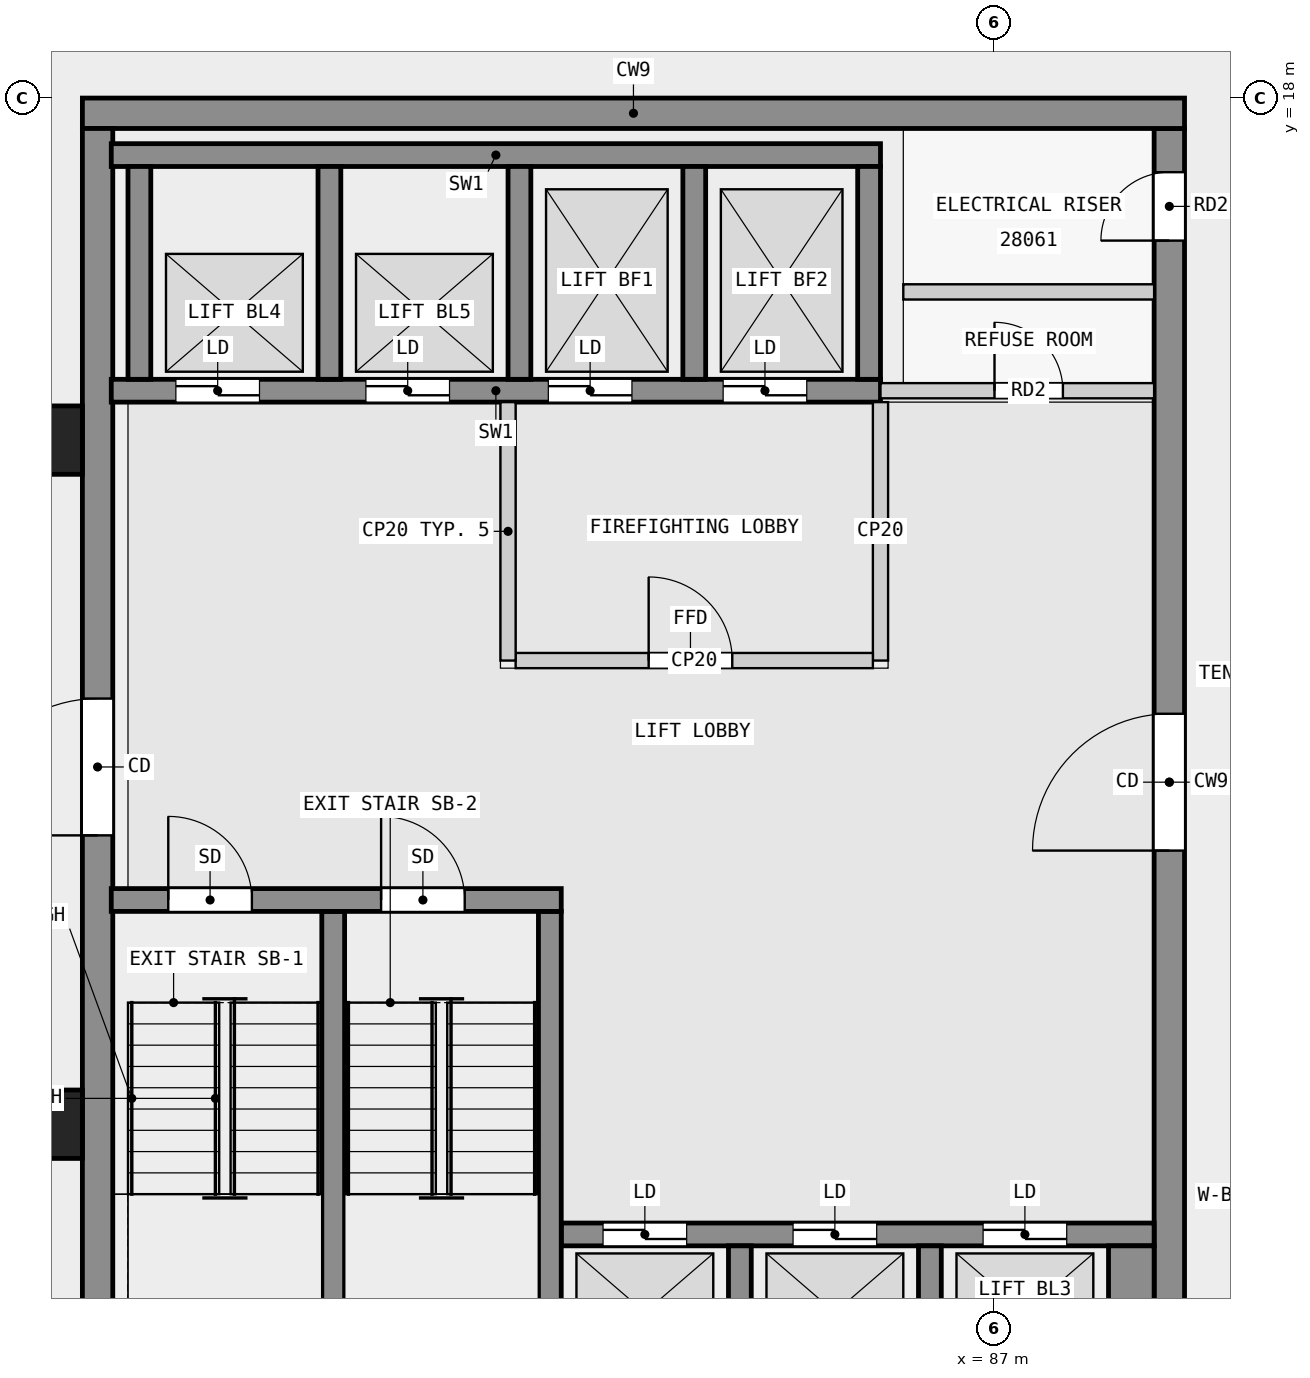
"""IFC4 building model, lengths in metres.
Left out: names, types, materials, properties, quantities, classifications, styles, units other than length and angle.
Written with IfcOpenShell. Run it as: python <this file> out.ifc"""

import sys

from ifc_helpers import new_model, si_unit, direction, frame, frame_2d, origin, origin_2d, place, context, subcontext, project, spatial, rectangle, extrude, element, fill, save


model = new_model("IFC4")
c1 = context("Model", 3, precision=1e-05, world=origin(), true_north=direction((0.0, 1.0)))
c2 = subcontext(c1, "Body", "Model", "MODEL_VIEW")
j1 = project(units=[si_unit("LENGTHUNIT", "METRE"), si_unit("PLANEANGLEUNIT", "RADIAN")], contexts=[c1])
p1 = place(None, origin())
s1 = spatial("IfcSite", under=j1, at=p1, CompositionType="ELEMENT")
p2 = place(p1, origin())
s2 = spatial("IfcBuilding", under=s1, at=p2, CompositionType="ELEMENT")
p3 = place(p2, frame((0.0, 0.0, 109.8)))
s3 = spatial("IfcBuildingStorey", under=s2, at=p3, CompositionType="ELEMENT", Elevation=109.8)
for number, where, z_axis, x_axis in (
    (1, (74.55, 13.5, 0.0), (0.0, 0.0, 1.0), (1.0, 0.0, 0.0)),
    (2, (74.55, 4.5, 0.0), (0.0, 0.0, 1.0), (1.0, 0.0, 0.0)),
):
    element("IfcColumn", number, at=place(p3, frame(where, z_axis=z_axis, x_axis=x_axis)), inside=s3, PredefinedType="COLUMN", context=c2, shape_type="SweptSolid", body=[
        extrude(rectangle(XDim=0.9, YDim=0.9, at=origin_2d()), origin(), (0.0, 0.0, 1.0), 3.5),
    ])
p4 = place(p3, frame((75.0, 17.8, 0.0), z_axis=(0.0, 0.0, 1.0), x_axis=(1.0, 0.0, 0.0)))
e3 = element("IfcWall", 3, at=p4, inside=s3, PredefinedType="SHEAR", context=c2, shape_type="SweptSolid", body=[
    extrude(rectangle(XDim=14.5, YDim=0.4, at=frame_2d((7.25, 0.0))), origin(), (0.0, 0.0, 1.0), 3.25),
])
p5 = place(p3, frame((75.2, 0.4, 0.0), z_axis=(0.0, 0.0, 1.0), x_axis=(0.0, 1.0, 0.0)))
e4 = element("IfcWall", 4, at=p5, inside=s3, PredefinedType="SHEAR", context=c2, shape_type="SweptSolid", body=[
    extrude(rectangle(XDim=17.2, YDim=0.4, at=frame_2d((8.6, 0.0))), origin(), (0.0, 0.0, 1.0), 3.25),
])
p6 = place(p5, frame((7.9, 0.0, 0.0)))
e5 = element("IfcOpeningElement", 5, at=p6, cuts=e4, PredefinedType="OPENING", context=c2, shape_type="SweptSolid", body=[
    extrude(rectangle(XDim=1.8, YDim=2.1, at=frame_2d((0.9, 1.05))), frame((0.0, 0.21, 0.0), z_axis=(0.0, -1.0, 0.0), x_axis=(1.0, 0.0, 0.0)), (0.0, 0.0, 1.0), 0.42),
])
p7 = place(p3, frame((89.3, 0.4, 0.0), z_axis=(0.0, 0.0, 1.0), x_axis=(0.0, 1.0, 0.0)))
e6 = element("IfcWall", 6, at=p7, inside=s3, PredefinedType="SHEAR", context=c2, shape_type="SweptSolid", body=[
    extrude(rectangle(XDim=17.2, YDim=0.4, at=frame_2d((8.6, 0.0))), origin(), (0.0, 0.0, 1.0), 3.25),
])
p8 = place(p7, frame((7.7, 0.0, 0.0)))
e7 = element("IfcOpeningElement", 7, at=p8, cuts=e6, PredefinedType="OPENING", context=c2, shape_type="SweptSolid", body=[
    extrude(rectangle(XDim=1.8, YDim=2.1, at=frame_2d((0.9, 1.05))), frame((0.0, 0.21, 0.0), z_axis=(0.0, -1.0, 0.0), x_axis=(1.0, 0.0, 0.0)), (0.0, 0.0, 1.0), 0.42),
])
p9 = place(p7, frame((15.725, 0.0, 0.0)))
e8 = element("IfcOpeningElement", 8, at=p9, cuts=e6, PredefinedType="OPENING", context=c2, shape_type="SweptSolid", body=[
    extrude(rectangle(XDim=0.9, YDim=2.1, at=frame_2d((0.45, 1.05))), frame((0.0, 0.21, 0.0), z_axis=(0.0, -1.0, 0.0), x_axis=(1.0, 0.0, 0.0)), (0.0, 0.0, 1.0), 0.42),
])
p10 = place(p3, frame((75.38, 7.45, 0.0), z_axis=(0.0, 0.0, 1.0), x_axis=(1.0, 0.0, 0.0)))
e9 = element("IfcWall", 9, at=p10, inside=s3, PredefinedType="SHEAR", context=c2, shape_type="SweptSolid", body=[
    extrude(rectangle(XDim=5.92, YDim=0.3, at=frame_2d((2.96, 0.0))), origin(), (0.0, 0.0, 1.0), 3.25),
])
p11 = place(p10, frame((0.75, 0.0, 0.0)))
e10 = element("IfcOpeningElement", 10, at=p11, cuts=e9, PredefinedType="OPENING", context=c2, shape_type="SweptSolid", body=[
    extrude(rectangle(XDim=1.1, YDim=2.1, at=frame_2d((0.55, 1.05))), frame((0.0, 0.16, 0.0), z_axis=(0.0, -1.0, 0.0), x_axis=(1.0, 0.0, 0.0)), (0.0, 0.0, 1.0), 0.32),
])
p12 = place(p10, frame((3.55, 0.0, 0.0)))
e11 = element("IfcOpeningElement", 11, at=p12, cuts=e9, PredefinedType="OPENING", context=c2, shape_type="SweptSolid", body=[
    extrude(rectangle(XDim=1.1, YDim=2.1, at=frame_2d((0.55, 1.05))), frame((0.0, 0.16, 0.0), z_axis=(0.0, -1.0, 0.0), x_axis=(1.0, 0.0, 0.0)), (0.0, 0.0, 1.0), 0.32),
])
for number, where, z_axis, x_axis in (
    (12, (78.3, 0.9, 0.0), (0.0, 0.0, 1.0), (0.0, 1.0, 0.0)),
    (13, (81.15, 0.9, 0.0), (0.0, 0.0, 1.0), (0.0, 1.0, 0.0)),
):
    element("IfcWall", number, at=place(p3, frame(where, z_axis=z_axis, x_axis=x_axis)), inside=s3, PredefinedType="SHEAR", context=c2, shape_type="SweptSolid", body=[
        extrude(rectangle(XDim=6.4, YDim=0.3, at=frame_2d((3.2, 0.0))), origin(), (0.0, 0.0, 1.0), 3.25),
    ])
for number, where, z_axis, x_axis in (
    (14, (83.65, 0.9, 0.0), (0.0, 0.0, 1.0), (0.0, 1.0, 0.0)),
    (15, (86.15, 0.9, 0.0), (0.0, 0.0, 1.0), (0.0, 1.0, 0.0)),
):
    element("IfcWall", number, at=place(p3, frame(where, z_axis=z_axis, x_axis=x_axis)), inside=s3, PredefinedType="SHEAR", context=c2, shape_type="SweptSolid", body=[
        extrude(rectangle(XDim=2.0, YDim=0.3, at=frame_2d((1.0, 0.0))), origin(), (0.0, 0.0, 1.0), 3.25),
    ])
p13 = place(p3, frame((88.8, 0.9, 0.0), z_axis=(0.0, 0.0, 1.0), x_axis=(0.0, 1.0, 0.0)))
e16 = element("IfcWall", 16, at=p13, inside=s3, PredefinedType="SHEAR", context=c2, shape_type="SweptSolid", body=[
    extrude(rectangle(XDim=2.0, YDim=0.6, at=frame_2d((1.0, 0.0))), origin(), (0.0, 0.0, 1.0), 3.25),
])
p14 = place(p3, frame((81.3, 3.05, 0.0), z_axis=(0.0, 0.0, 1.0), x_axis=(1.0, 0.0, 0.0)))
e17 = element("IfcWall", 17, at=p14, inside=s3, PredefinedType="SHEAR", context=c2, shape_type="SweptSolid", body=[
    extrude(rectangle(XDim=7.8, YDim=0.3, at=frame_2d((3.9, 0.0))), origin(), (0.0, 0.0, 1.0), 3.25),
])
p15 = place(p14, frame((0.55, 0.0, 0.0)))
e18 = element("IfcOpeningElement", 18, at=p15, cuts=e17, PredefinedType="OPENING", context=c2, shape_type="SweptSolid", body=[
    extrude(rectangle(XDim=1.1, YDim=2.1, at=frame_2d((0.55, 1.05))), frame((0.0, 0.16, 0.0), z_axis=(0.0, -1.0, 0.0), x_axis=(1.0, 0.0, 0.0)), (0.0, 0.0, 1.0), 0.32),
])
p16 = place(p14, frame((3.05, 0.0, 0.0)))
e19 = element("IfcOpeningElement", 19, at=p16, cuts=e17, PredefinedType="OPENING", context=c2, shape_type="SweptSolid", body=[
    extrude(rectangle(XDim=1.1, YDim=2.1, at=frame_2d((0.55, 1.05))), frame((0.0, 0.16, 0.0), z_axis=(0.0, -1.0, 0.0), x_axis=(1.0, 0.0, 0.0)), (0.0, 0.0, 1.0), 0.32),
])
p17 = place(p14, frame((5.55, 0.0, 0.0)))
e20 = element("IfcOpeningElement", 20, at=p17, cuts=e17, PredefinedType="OPENING", context=c2, shape_type="SweptSolid", body=[
    extrude(rectangle(XDim=1.1, YDim=2.1, at=frame_2d((0.55, 1.05))), frame((0.0, 0.16, 0.0), z_axis=(0.0, -1.0, 0.0), x_axis=(1.0, 0.0, 0.0)), (0.0, 0.0, 1.0), 0.32),
])
p18 = place(p3, frame((75.38, 17.25, 0.0), z_axis=(0.0, 0.0, 1.0), x_axis=(1.0, 0.0, 0.0)))
e21 = element("IfcWall", 21, at=p18, inside=s3, PredefinedType="SHEAR", context=c2, shape_type="SweptSolid", body=[
    extrude(rectangle(XDim=10.12, YDim=0.3, at=frame_2d((5.06, 0.0))), origin(), (0.0, 0.0, 1.0), 3.25),
])
p19 = place(p3, frame((75.38, 14.15, 0.0), z_axis=(0.0, 0.0, 1.0), x_axis=(1.0, 0.0, 0.0)))
e22 = element("IfcWall", 22, at=p19, inside=s3, PredefinedType="SHEAR", context=c2, shape_type="SweptSolid", body=[
    extrude(rectangle(XDim=10.12, YDim=0.3, at=frame_2d((5.06, 0.0))), origin(), (0.0, 0.0, 1.0), 3.25),
])
p20 = place(p19, frame((0.85, 0.0, 0.0)))
e23 = element("IfcOpeningElement", 23, at=p20, cuts=e22, PredefinedType="OPENING", context=c2, shape_type="SweptSolid", body=[
    extrude(rectangle(XDim=1.1, YDim=2.1, at=frame_2d((0.55, 1.05))), frame((0.0, 0.16, 0.0), z_axis=(0.0, -1.0, 0.0), x_axis=(1.0, 0.0, 0.0)), (0.0, 0.0, 1.0), 0.32),
])
p21 = place(p19, frame((3.35, 0.0, 0.0)))
e24 = element("IfcOpeningElement", 24, at=p21, cuts=e22, PredefinedType="OPENING", context=c2, shape_type="SweptSolid", body=[
    extrude(rectangle(XDim=1.1, YDim=2.1, at=frame_2d((0.55, 1.05))), frame((0.0, 0.16, 0.0), z_axis=(0.0, -1.0, 0.0), x_axis=(1.0, 0.0, 0.0)), (0.0, 0.0, 1.0), 0.32),
])
p22 = place(p19, frame((5.75, 0.0, 0.0)))
e25 = element("IfcOpeningElement", 25, at=p22, cuts=e22, PredefinedType="OPENING", context=c2, shape_type="SweptSolid", body=[
    extrude(rectangle(XDim=1.1, YDim=2.1, at=frame_2d((0.55, 1.05))), frame((0.0, 0.16, 0.0), z_axis=(0.0, -1.0, 0.0), x_axis=(1.0, 0.0, 0.0)), (0.0, 0.0, 1.0), 0.32),
])
p23 = place(p19, frame((8.05, 0.0, 0.0)))
e26 = element("IfcOpeningElement", 26, at=p23, cuts=e22, PredefinedType="OPENING", context=c2, shape_type="SweptSolid", body=[
    extrude(rectangle(XDim=1.1, YDim=2.1, at=frame_2d((0.55, 1.05))), frame((0.0, 0.16, 0.0), z_axis=(0.0, -1.0, 0.0), x_axis=(1.0, 0.0, 0.0)), (0.0, 0.0, 1.0), 0.32),
])
for number, where, z_axis, x_axis in (
    (27, (75.75, 14.3, 0.0), (0.0, 0.0, 1.0), (0.0, 1.0, 0.0)),
    (28, (78.25, 14.3, 0.0), (0.0, 0.0, 1.0), (0.0, 1.0, 0.0)),
    (29, (80.75, 14.3, 0.0), (0.0, 0.0, 1.0), (0.0, 1.0, 0.0)),
    (30, (83.05, 14.3, 0.0), (0.0, 0.0, 1.0), (0.0, 1.0, 0.0)),
    (31, (85.35, 14.3, 0.0), (0.0, 0.0, 1.0), (0.0, 1.0, 0.0)),
):
    element("IfcWall", number, at=place(p3, frame(where, z_axis=z_axis, x_axis=x_axis)), inside=s3, PredefinedType="SHEAR", context=c2, shape_type="SweptSolid", body=[
        extrude(rectangle(XDim=2.8, YDim=0.3, at=frame_2d((1.4, 0.0))), origin(), (0.0, 0.0, 1.0), 3.25),
    ])
p24 = place(p3, frame((80.6, 10.6, 0.0), z_axis=(0.0, 0.0, 1.0), x_axis=(0.0, 1.0, 0.0)))
e32 = element("IfcWall", 32, at=p24, inside=s3, PredefinedType="PARTITIONING", context=c2, shape_type="SweptSolid", body=[
    extrude(rectangle(XDim=3.4, YDim=0.2, at=frame_2d((1.7, 0.0))), origin(), (0.0, 0.0, 1.0), 3.25),
])
p25 = place(p3, frame((80.7, 10.6, 0.0), z_axis=(0.0, 0.0, 1.0), x_axis=(1.0, 0.0, 0.0)))
e33 = element("IfcWall", 33, at=p25, inside=s3, PredefinedType="PARTITIONING", context=c2, shape_type="SweptSolid", body=[
    extrude(rectangle(XDim=4.7, YDim=0.2, at=frame_2d((2.35, 0.0))), origin(), (0.0, 0.0, 1.0), 3.25),
])
p26 = place(p25, frame((1.75, 0.0, 0.0)))
e34 = element("IfcOpeningElement", 34, at=p26, cuts=e33, PredefinedType="OPENING", context=c2, shape_type="SweptSolid", body=[
    extrude(rectangle(XDim=1.1, YDim=2.1, at=frame_2d((0.55, 1.05))), frame((0.0, 0.11, 0.0), z_axis=(0.0, -1.0, 0.0), x_axis=(1.0, 0.0, 0.0)), (0.0, 0.0, 1.0), 0.22),
])
p27 = place(p3, frame((85.5, 10.6, 0.0), z_axis=(0.0, 0.0, 1.0), x_axis=(0.0, 1.0, 0.0)))
e35 = element("IfcWall", 35, at=p27, inside=s3, PredefinedType="PARTITIONING", context=c2, shape_type="SweptSolid", body=[
    extrude(rectangle(XDim=3.4, YDim=0.2, at=frame_2d((1.7, 0.0))), origin(), (0.0, 0.0, 1.0), 3.25),
])
p28 = place(p3, frame((85.5, 14.15, 0.0), z_axis=(0.0, 0.0, 1.0), x_axis=(1.0, 0.0, 0.0)))
e36 = element("IfcWall", 36, at=p28, inside=s3, PredefinedType="PARTITIONING", context=c2, shape_type="SweptSolid", body=[
    extrude(rectangle(XDim=3.6, YDim=0.2, at=frame_2d((1.8, 0.0))), origin(), (0.0, 0.0, 1.0), 3.25),
])
p29 = place(p28, frame((1.5, 0.0, 0.0)))
e37 = element("IfcOpeningElement", 37, at=p29, cuts=e36, PredefinedType="OPENING", context=c2, shape_type="SweptSolid", body=[
    extrude(rectangle(XDim=0.9, YDim=2.1, at=frame_2d((0.45, 1.05))), frame((0.0, 0.11, 0.0), z_axis=(0.0, -1.0, 0.0), x_axis=(1.0, 0.0, 0.0)), (0.0, 0.0, 1.0), 0.22),
])
p30 = place(p3, frame((85.8, 15.45, 0.0), z_axis=(0.0, 0.0, 1.0), x_axis=(1.0, 0.0, 0.0)))
e38 = element("IfcWall", 38, at=p30, inside=s3, PredefinedType="PARTITIONING", context=c2, shape_type="SweptSolid", body=[
    extrude(rectangle(XDim=3.3, YDim=0.2, at=frame_2d((1.65, 0.0))), origin(), (0.0, 0.0, 1.0), 3.25),
])
p31 = place(p26, origin())
e39 = element("IfcDoor", 39, at=p31, inside=s3, OperationType="SINGLE_SWING_LEFT", PredefinedType="DOOR", context=c2, shape_type="SweptSolid", body=[
    extrude(rectangle(XDim=1.1, YDim=2.1, at=frame_2d((0.55, 1.05))), frame((0.0, 0.025, 0.0), z_axis=(0.0, -1.0, 0.0), x_axis=(1.0, 0.0, 0.0)), (0.0, 0.0, 1.0), 0.05),
])
fill(e34, e39)
p32 = place(p15, origin())
e40 = element("IfcDoor", 40, at=p32, inside=s3, OperationType="DOUBLE_DOOR_SLIDING", PredefinedType="DOOR", context=c2, shape_type="SweptSolid", body=[
    extrude(rectangle(XDim=1.1, YDim=2.1, at=frame_2d((0.55, 1.05))), frame((0.0, 0.025, 0.0), z_axis=(0.0, -1.0, 0.0), x_axis=(1.0, 0.0, 0.0)), (0.0, 0.0, 1.0), 0.05),
])
fill(e18, e40)
p33 = place(p16, origin())
e41 = element("IfcDoor", 41, at=p33, inside=s3, OperationType="DOUBLE_DOOR_SLIDING", PredefinedType="DOOR", context=c2, shape_type="SweptSolid", body=[
    extrude(rectangle(XDim=1.1, YDim=2.1, at=frame_2d((0.55, 1.05))), frame((0.0, 0.025, 0.0), z_axis=(0.0, -1.0, 0.0), x_axis=(1.0, 0.0, 0.0)), (0.0, 0.0, 1.0), 0.05),
])
fill(e19, e41)
p34 = place(p17, origin())
e42 = element("IfcDoor", 42, at=p34, inside=s3, OperationType="DOUBLE_DOOR_SLIDING", PredefinedType="DOOR", context=c2, shape_type="SweptSolid", body=[
    extrude(rectangle(XDim=1.1, YDim=2.1, at=frame_2d((0.55, 1.05))), frame((0.0, 0.025, 0.0), z_axis=(0.0, -1.0, 0.0), x_axis=(1.0, 0.0, 0.0)), (0.0, 0.0, 1.0), 0.05),
])
fill(e20, e42)
p35 = place(p20, origin())
e43 = element("IfcDoor", 43, at=p35, inside=s3, OperationType="DOUBLE_DOOR_SLIDING", PredefinedType="DOOR", context=c2, shape_type="SweptSolid", body=[
    extrude(rectangle(XDim=1.1, YDim=2.1, at=frame_2d((0.55, 1.05))), frame((0.0, 0.025, 0.0), z_axis=(0.0, -1.0, 0.0), x_axis=(1.0, 0.0, 0.0)), (0.0, 0.0, 1.0), 0.05),
])
fill(e23, e43)
p36 = place(p21, origin())
e44 = element("IfcDoor", 44, at=p36, inside=s3, OperationType="DOUBLE_DOOR_SLIDING", PredefinedType="DOOR", context=c2, shape_type="SweptSolid", body=[
    extrude(rectangle(XDim=1.1, YDim=2.1, at=frame_2d((0.55, 1.05))), frame((0.0, 0.025, 0.0), z_axis=(0.0, -1.0, 0.0), x_axis=(1.0, 0.0, 0.0)), (0.0, 0.0, 1.0), 0.05),
])
fill(e24, e44)
p37 = place(p22, origin())
e45 = element("IfcDoor", 45, at=p37, inside=s3, OperationType="DOUBLE_DOOR_SLIDING", PredefinedType="DOOR", context=c2, shape_type="SweptSolid", body=[
    extrude(rectangle(XDim=1.1, YDim=2.1, at=frame_2d((0.55, 1.05))), frame((0.0, 0.025, 0.0), z_axis=(0.0, -1.0, 0.0), x_axis=(1.0, 0.0, 0.0)), (0.0, 0.0, 1.0), 0.05),
])
fill(e25, e45)
p38 = place(p23, origin())
e46 = element("IfcDoor", 46, at=p38, inside=s3, OperationType="DOUBLE_DOOR_SLIDING", PredefinedType="DOOR", context=c2, shape_type="SweptSolid", body=[
    extrude(rectangle(XDim=1.1, YDim=2.1, at=frame_2d((0.55, 1.05))), frame((0.0, 0.025, 0.0), z_axis=(0.0, -1.0, 0.0), x_axis=(1.0, 0.0, 0.0)), (0.0, 0.0, 1.0), 0.05),
])
fill(e26, e46)
p39 = place(p11, origin())
e47 = element("IfcDoor", 47, at=p39, inside=s3, OperationType="SINGLE_SWING_RIGHT", PredefinedType="DOOR", context=c2, shape_type="SweptSolid", body=[
    extrude(rectangle(XDim=1.1, YDim=2.1, at=frame_2d((0.55, 1.05))), frame((0.0, 0.025, 0.0), z_axis=(0.0, -1.0, 0.0), x_axis=(1.0, 0.0, 0.0)), (0.0, 0.0, 1.0), 0.05),
])
fill(e10, e47)
p40 = place(p12, origin())
e48 = element("IfcDoor", 48, at=p40, inside=s3, OperationType="SINGLE_SWING_LEFT", PredefinedType="DOOR", context=c2, shape_type="SweptSolid", body=[
    extrude(rectangle(XDim=1.1, YDim=2.1, at=frame_2d((0.55, 1.05))), frame((0.0, 0.025, 0.0), z_axis=(0.0, -1.0, 0.0), x_axis=(1.0, 0.0, 0.0)), (0.0, 0.0, 1.0), 0.05),
])
fill(e11, e48)
p41 = place(p6, origin())
e49 = element("IfcDoor", 49, at=p41, inside=s3, OperationType="DOUBLE_DOOR_SINGLE_SWING", PredefinedType="DOOR", context=c2, shape_type="SweptSolid", body=[
    extrude(rectangle(XDim=1.8, YDim=2.1, at=frame_2d((0.9, 1.05))), frame((0.0, 0.025, 0.0), z_axis=(0.0, -1.0, 0.0), x_axis=(1.0, 0.0, 0.0)), (0.0, 0.0, 1.0), 0.05),
])
fill(e5, e49)
p42 = place(p8, origin())
e50 = element("IfcDoor", 50, at=p42, inside=s3, OperationType="DOUBLE_DOOR_SINGLE_SWING", PredefinedType="DOOR", context=c2, shape_type="SweptSolid", body=[
    extrude(rectangle(XDim=1.8, YDim=2.1, at=frame_2d((0.9, 1.05))), frame((0.0, 0.025, 0.0), z_axis=(0.0, -1.0, 0.0), x_axis=(1.0, 0.0, 0.0)), (0.0, 0.0, 1.0), 0.05),
])
fill(e7, e50)
p43 = place(p29, origin())
e51 = element("IfcDoor", 51, at=p43, inside=s3, OperationType="SINGLE_SWING_LEFT", PredefinedType="DOOR", context=c2, shape_type="SweptSolid", body=[
    extrude(rectangle(XDim=0.9, YDim=2.1, at=frame_2d((0.45, 1.05))), frame((0.0, 0.025, 0.0), z_axis=(0.0, -1.0, 0.0), x_axis=(1.0, 0.0, 0.0)), (0.0, 0.0, 1.0), 0.05),
])
fill(e37, e51)
p44 = place(p9, origin())
e52 = element("IfcDoor", 52, at=p44, inside=s3, OperationType="SINGLE_SWING_LEFT", PredefinedType="DOOR", context=c2, shape_type="SweptSolid", body=[
    extrude(rectangle(XDim=0.9, YDim=2.1, at=frame_2d((0.45, 1.05))), frame((0.0, 0.025, 0.0), z_axis=(0.0, -1.0, 0.0), x_axis=(1.0, 0.0, 0.0)), (0.0, 0.0, 1.0), 0.05),
])
fill(e8, e52)
save(model, sys.argv[1])
